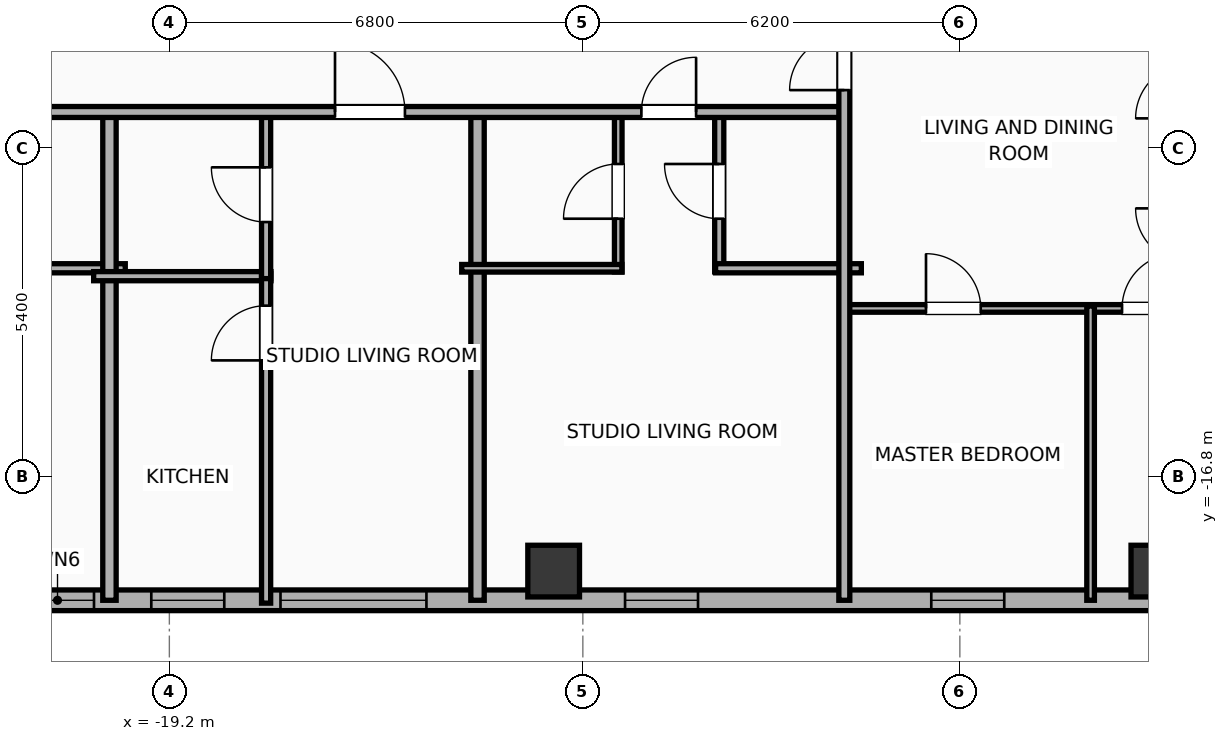
"""IFC4 building model, lengths in metres.
Left out: names, types, materials, properties, quantities, classifications, styles, units other than length and angle.
Written with IfcOpenShell. Run it as: python <this file> out.ifc"""

import sys

from ifc_helpers import new_model, si_unit, direction, frame, frame_2d, origin, origin_2d, place, context, subcontext, project, spatial, rectangle, hollow_rectangle, extrude, element, fill, save


model = new_model("IFC4")
c1 = context("Model", 3, precision=1e-05, world=origin(), true_north=direction((0.0, 1.0)))
c2 = subcontext(c1, "Body", "Model", "MODEL_VIEW")
j1 = project(units=[si_unit("LENGTHUNIT", "METRE"), si_unit("PLANEANGLEUNIT", "RADIAN")], contexts=[c1])
p1 = place(None, origin())
s1 = spatial("IfcSite", under=j1, at=p1, CompositionType="ELEMENT")
p2 = place(p1, origin())
s2 = spatial("IfcBuilding", under=s1, at=p2, CompositionType="ELEMENT")
p3 = place(p2, frame((0.0, 0.0, 219.7)))
s3 = spatial("IfcBuildingStorey", under=s2, at=p3, CompositionType="ELEMENT", Elevation=219.7)
for number, where, z_axis, x_axis in (
    (1, (-12.88, -18.35, 0.0), (0.0, 0.0, 1.0), (1.0, 0.0, 0.0)),
    (2, (-2.96, -18.35, 0.0), (0.0, 0.0, 1.0), (1.0, 0.0, 0.0)),
):
    element("IfcColumn", number, at=place(p3, frame(where, z_axis=z_axis, x_axis=x_axis)), inside=s3, PredefinedType="COLUMN", context=c2, shape_type="SweptSolid", body=[
        extrude(hollow_rectangle(XDim=0.85, YDim=0.85, WallThickness=0.028, at=origin_2d()), origin(), (0.0, 0.0, 1.0), 3.9),
    ])
p4 = place(p3, frame((26.783, -18.83, 0.0), z_axis=(0.0, 0.0, 1.0), x_axis=(-1.0, 0.0, 0.0)))
e3 = element("IfcWall", 3, at=p4, inside=s3, PredefinedType="ELEMENTEDWALL", context=c2, shape_type="SweptSolid", body=[
    extrude(rectangle(XDim=49.566, YDim=0.34, at=frame_2d((24.783, 0.0))), origin(), (0.0, 0.0, 1.0), 3.65),
])
p5 = place(p4, frame((23.583, 0.0, 0.75)))
e4 = element("IfcOpeningElement", 4, at=p5, cuts=e3, PredefinedType="OPENING", context=c2, shape_type="SweptSolid", body=[
    extrude(rectangle(XDim=2.4, YDim=2.1, at=frame_2d((1.2, 1.05))), frame((0.0, 0.18, 0.0), z_axis=(0.0, -1.0, 0.0), x_axis=(1.0, 0.0, 0.0)), (0.0, 0.0, 1.0), 0.36),
])
p6 = place(p4, frame((41.756, 0.0, 0.75)))
e5 = element("IfcOpeningElement", 5, at=p6, cuts=e3, PredefinedType="OPENING", context=c2, shape_type="SweptSolid", body=[
    extrude(rectangle(XDim=2.4, YDim=2.1, at=frame_2d((1.2, 1.05))), frame((0.0, 0.18, 0.0), z_axis=(0.0, -1.0, 0.0), x_axis=(1.0, 0.0, 0.0)), (0.0, 0.0, 1.0), 0.36),
])
p7 = place(p4, frame((47.222, 0.0, 0.75)))
e6 = element("IfcOpeningElement", 6, at=p7, cuts=e3, PredefinedType="OPENING", context=c2, shape_type="SweptSolid", body=[
    extrude(rectangle(XDim=1.2, YDim=2.05, at=frame_2d((0.6, 1.025))), frame((0.0, 0.18, 0.0), z_axis=(0.0, -1.0, 0.0), x_axis=(1.0, 0.0, 0.0)), (0.0, 0.0, 1.0), 0.36),
])
p8 = place(p4, frame((45.08, 0.0, 0.75)))
e7 = element("IfcOpeningElement", 7, at=p8, cuts=e3, PredefinedType="OPENING", context=c2, shape_type="SweptSolid", body=[
    extrude(rectangle(XDim=1.2, YDim=2.05, at=frame_2d((0.6, 1.025))), frame((0.0, 0.18, 0.0), z_axis=(0.0, -1.0, 0.0), x_axis=(1.0, 0.0, 0.0)), (0.0, 0.0, 1.0), 0.36),
])
p9 = place(p4, frame((37.289, 0.0, 0.75)))
e8 = element("IfcOpeningElement", 8, at=p9, cuts=e3, PredefinedType="OPENING", context=c2, shape_type="SweptSolid", body=[
    extrude(rectangle(XDim=1.2, YDim=2.05, at=frame_2d((0.6, 1.025))), frame((0.0, 0.18, 0.0), z_axis=(0.0, -1.0, 0.0), x_axis=(1.0, 0.0, 0.0)), (0.0, 0.0, 1.0), 0.36),
])
p10 = place(p4, frame((16.115, 0.0, 0.75)))
e9 = element("IfcOpeningElement", 9, at=p10, cuts=e3, PredefinedType="OPENING", context=c2, shape_type="SweptSolid", body=[
    extrude(rectangle(XDim=1.2, YDim=2.05, at=frame_2d((0.6, 1.025))), frame((0.0, 0.18, 0.0), z_axis=(0.0, -1.0, 0.0), x_axis=(1.0, 0.0, 0.0)), (0.0, 0.0, 1.0), 0.36),
])
p11 = place(p4, frame((12.422, 0.0, 0.75)))
e10 = element("IfcOpeningElement", 10, at=p11, cuts=e3, PredefinedType="OPENING", context=c2, shape_type="SweptSolid", body=[
    extrude(rectangle(XDim=1.2, YDim=2.05, at=frame_2d((0.6, 1.025))), frame((0.0, 0.18, 0.0), z_axis=(0.0, -1.0, 0.0), x_axis=(1.0, 0.0, 0.0)), (0.0, 0.0, 1.0), 0.36),
])
p12 = place(p4, frame((8.09, 0.0, 0.75)))
e11 = element("IfcOpeningElement", 11, at=p12, cuts=e3, PredefinedType="OPENING", context=c2, shape_type="SweptSolid", body=[
    extrude(rectangle(XDim=1.2, YDim=2.05, at=frame_2d((0.6, 1.025))), frame((0.0, 0.18, 0.0), z_axis=(0.0, -1.0, 0.0), x_axis=(1.0, 0.0, 0.0)), (0.0, 0.0, 1.0), 0.36),
])
p13 = place(p4, frame((4.637, 0.0, 0.75)))
e12 = element("IfcOpeningElement", 12, at=p13, cuts=e3, PredefinedType="OPENING", context=c2, shape_type="SweptSolid", body=[
    extrude(rectangle(XDim=1.2, YDim=2.05, at=frame_2d((0.6, 1.025))), frame((0.0, 0.18, 0.0), z_axis=(0.0, -1.0, 0.0), x_axis=(1.0, 0.0, 0.0)), (0.0, 0.0, 1.0), 0.36),
])
p14 = place(p4, frame((1.811, 0.0, 0.75)))
e13 = element("IfcOpeningElement", 13, at=p14, cuts=e3, PredefinedType="OPENING", context=c2, shape_type="SweptSolid", body=[
    extrude(rectangle(XDim=1.2, YDim=2.05, at=frame_2d((0.6, 1.025))), frame((0.0, 0.18, 0.0), z_axis=(0.0, -1.0, 0.0), x_axis=(1.0, 0.0, 0.0)), (0.0, 0.0, 1.0), 0.36),
])
p15 = place(p4, frame((32.253, 0.0, 0.75)))
e14 = element("IfcOpeningElement", 14, at=p15, cuts=e3, PredefinedType="OPENING", context=c2, shape_type="SweptSolid", body=[
    extrude(rectangle(XDim=1.2, YDim=2.05, at=frame_2d((0.6, 1.025))), frame((0.0, 0.18, 0.0), z_axis=(0.0, -1.0, 0.0), x_axis=(1.0, 0.0, 0.0)), (0.0, 0.0, 1.0), 0.36),
])
p16 = place(p4, frame((27.853, 0.0, 0.75)))
e15 = element("IfcOpeningElement", 15, at=p16, cuts=e3, PredefinedType="OPENING", context=c2, shape_type="SweptSolid", body=[
    extrude(rectangle(XDim=1.2, YDim=2.05, at=frame_2d((0.6, 1.025))), frame((0.0, 0.18, 0.0), z_axis=(0.0, -1.0, 0.0), x_axis=(1.0, 0.0, 0.0)), (0.0, 0.0, 1.0), 0.36),
])
p17 = place(p4, frame((20.473, 0.0, 0.75)))
e16 = element("IfcOpeningElement", 16, at=p17, cuts=e3, PredefinedType="OPENING", context=c2, shape_type="SweptSolid", body=[
    extrude(rectangle(XDim=1.2, YDim=2.05, at=frame_2d((0.6, 1.025))), frame((0.0, 0.18, 0.0), z_axis=(0.0, -1.0, 0.0), x_axis=(1.0, 0.0, 0.0)), (0.0, 0.0, 1.0), 0.36),
])
p18 = place(p3, frame((-22.342, -13.37, 0.0), z_axis=(0.0, 0.0, 1.0), x_axis=(1.0, 0.0, 0.0)))
e17 = element("IfcWall", 17, at=p18, inside=s3, PredefinedType="PLUMBINGWALL", context=c2, shape_type="SweptSolid", body=[
    extrude(rectangle(XDim=2.417, YDim=0.15, at=frame_2d((1.208, 0.0))), origin(), (0.0, 0.0, 1.0), 3.65),
])
p19 = place(p3, frame((-20.185, -18.83, 0.0), z_axis=(0.0, 0.0, 1.0), x_axis=(0.0, 1.0, 0.0)))
e18 = element("IfcWall", 18, at=p19, inside=s3, PredefinedType="PARTITIONING", context=c2, shape_type="SweptSolid", body=[
    extrude(rectangle(XDim=8.11, YDim=0.22, at=frame_2d((4.055, 0.0))), origin(), (0.0, 0.0, 1.0), 3.09),
])
p20 = place(p3, frame((-20.445, -13.5, 0.0), z_axis=(0.0, 0.0, 1.0), x_axis=(1.0, 0.0, 0.0)))
e19 = element("IfcWall", 19, at=p20, inside=s3, PredefinedType="PLUMBINGWALL", context=c2, shape_type="SweptSolid", body=[
    extrude(rectangle(XDim=2.916, YDim=0.15, at=frame_2d((1.458, 0.0))), origin(), (0.0, 0.0, 1.0), 3.65),
])
p21 = place(p3, frame((-17.609, -18.877, 0.0), z_axis=(0.0, 0.0, 1.0), x_axis=(0.0, 1.0, 0.0)))
e20 = element("IfcWall", 20, at=p21, inside=s3, PredefinedType="PLUMBINGWALL", context=c2, shape_type="SweptSolid", body=[
    extrude(rectangle(XDim=5.417, YDim=0.15, at=frame_2d((2.708, 0.0))), origin(), (0.0, 0.0, 1.0), 3.65),
])
p22 = place(p21, frame((3.992, 0.0, 0.0)))
e21 = element("IfcOpeningElement", 21, at=p22, cuts=e20, PredefinedType="OPENING", context=c2, shape_type="SweptSolid", body=[
    extrude(rectangle(XDim=0.9, YDim=2.05, at=frame_2d((0.45, 1.025))), frame((0.0, 0.085, 0.0), z_axis=(0.0, -1.0, 0.0), x_axis=(1.0, 0.0, 0.0)), (0.0, 0.0, 1.0), 0.17),
])
p23 = place(p3, frame((-17.609, -13.54, 0.0), z_axis=(0.0, 0.0, 1.0), x_axis=(0.0, 1.0, 0.0)))
e22 = element("IfcWall", 22, at=p23, inside=s3, PredefinedType="PLUMBINGWALL", context=c2, shape_type="SweptSolid", body=[
    extrude(rectangle(XDim=2.76, YDim=0.15, at=frame_2d((1.38, 0.0))), origin(), (0.0, 0.0, 1.0), 3.65),
])
p24 = place(p23, frame((0.93, 0.0, 0.0)))
e23 = element("IfcOpeningElement", 23, at=p24, cuts=e22, PredefinedType="OPENING", context=c2, shape_type="SweptSolid", body=[
    extrude(rectangle(XDim=0.9, YDim=2.05, at=frame_2d((0.45, 1.025))), frame((0.0, 0.085, 0.0), z_axis=(0.0, -1.0, 0.0), x_axis=(1.0, 0.0, 0.0)), (0.0, 0.0, 1.0), 0.17),
])
p25 = place(p3, frame((-14.132, -18.83, 0.0), z_axis=(0.0, 0.0, 1.0), x_axis=(0.0, 1.0, 0.0)))
e24 = element("IfcWall", 24, at=p25, inside=s3, PredefinedType="PARTITIONING", context=c2, shape_type="SweptSolid", body=[
    extrude(rectangle(XDim=8.11, YDim=0.22, at=frame_2d((4.055, 0.0))), origin(), (0.0, 0.0, 1.0), 3.65),
])
p26 = place(p3, frame((-11.818, -13.43, 0.0), z_axis=(0.0, 0.0, 1.0), x_axis=(0.0, 1.0, 0.0)))
e25 = element("IfcWall", 25, at=p26, inside=s3, PredefinedType="PARTITIONING", context=c2, shape_type="SweptSolid", body=[
    extrude(rectangle(XDim=2.65, YDim=0.125, at=frame_2d((1.325, 0.0))), origin(), (0.0, 0.0, 1.0), 3.65),
])
p27 = place(p26, frame((0.875, 0.0, 0.0)))
e26 = element("IfcOpeningElement", 26, at=p27, cuts=e25, PredefinedType="OPENING", context=c2, shape_type="SweptSolid", body=[
    extrude(rectangle(XDim=0.9, YDim=2.05, at=frame_2d((0.45, 1.025))), frame((0.0, 0.073, 0.0), z_axis=(0.0, -1.0, 0.0), x_axis=(1.0, 0.0, 0.0)), (0.0, 0.0, 1.0), 0.145),
])
p28 = place(p3, frame((-10.157, -13.43, 0.0), z_axis=(0.0, 0.0, 1.0), x_axis=(0.0, 1.0, 0.0)))
e27 = element("IfcWall", 27, at=p28, inside=s3, PredefinedType="PLUMBINGWALL", context=c2, shape_type="SweptSolid", body=[
    extrude(rectangle(XDim=2.65, YDim=0.15, at=frame_2d((1.325, 0.0))), origin(), (0.0, 0.0, 1.0), 3.65),
])
p29 = place(p28, frame((0.875, 0.0, 0.0)))
e28 = element("IfcOpeningElement", 28, at=p29, cuts=e27, PredefinedType="OPENING", context=c2, shape_type="SweptSolid", body=[
    extrude(rectangle(XDim=0.9, YDim=2.05, at=frame_2d((0.45, 1.025))), frame((0.0, 0.085, 0.0), z_axis=(0.0, -1.0, 0.0), x_axis=(1.0, 0.0, 0.0)), (0.0, 0.0, 1.0), 0.17),
])
p30 = place(p3, frame((-14.392, -13.37, 0.0), z_axis=(0.0, 0.0, 1.0), x_axis=(1.0, 0.0, 0.0)))
e29 = element("IfcWall", 29, at=p30, inside=s3, PredefinedType="PARTITIONING", context=c2, shape_type="SweptSolid", body=[
    extrude(rectangle(XDim=2.634, YDim=0.125, at=frame_2d((1.317, 0.0))), origin(), (0.0, 0.0, 1.0), 3.65),
])
p31 = place(p3, frame((-10.217, -13.37, 0.0), z_axis=(0.0, 0.0, 1.0), x_axis=(1.0, 0.0, 0.0)))
e30 = element("IfcWall", 30, at=p31, inside=s3, PredefinedType="PLUMBINGWALL", context=c2, shape_type="SweptSolid", body=[
    extrude(rectangle(XDim=2.397, YDim=0.15, at=frame_2d((1.198, 0.0))), origin(), (0.0, 0.0, 1.0), 3.65),
])
p32 = place(p3, frame((-26.23, -10.8, 0.0), z_axis=(0.0, 0.0, 1.0), x_axis=(1.0, 0.0, 0.0)))
e31 = element("IfcWall", 31, at=p32, inside=s3, PredefinedType="PARTITIONING", context=c2, shape_type="SweptSolid", body=[
    extrude(rectangle(XDim=18.15, YDim=0.18, at=frame_2d((9.075, 0.0))), origin(), (0.0, 0.0, 1.0), 3.65),
])
p33 = place(p32, frame((2.659, 0.0, 0.0)))
e32 = element("IfcOpeningElement", 32, at=p33, cuts=e31, PredefinedType="OPENING", context=c2, shape_type="SweptSolid", body=[
    extrude(rectangle(XDim=0.9, YDim=2.05, at=frame_2d((0.45, 1.025))), frame((0.0, 0.1, 0.0), z_axis=(0.0, -1.0, 0.0), x_axis=(1.0, 0.0, 0.0)), (0.0, 0.0, 1.0), 0.2),
])
p34 = place(p32, frame((9.754, 0.0, 0.0)))
e33 = element("IfcOpeningElement", 33, at=p34, cuts=e31, PredefinedType="OPENING", context=c2, shape_type="SweptSolid", body=[
    extrude(rectangle(XDim=1.15, YDim=2.05, at=frame_2d((0.575, 1.025))), frame((0.0, 0.1, 0.0), z_axis=(0.0, -1.0, 0.0), x_axis=(1.0, 0.0, 0.0)), (0.0, 0.0, 1.0), 0.2),
])
p35 = place(p32, frame((14.792, 0.0, 0.0)))
e34 = element("IfcOpeningElement", 34, at=p35, cuts=e31, PredefinedType="OPENING", context=c2, shape_type="SweptSolid", body=[
    extrude(rectangle(XDim=0.9, YDim=2.05, at=frame_2d((0.45, 1.025))), frame((0.0, 0.1, 0.0), z_axis=(0.0, -1.0, 0.0), x_axis=(1.0, 0.0, 0.0)), (0.0, 0.0, 1.0), 0.2),
])
p36 = place(p3, frame((-8.08, -14.03, 0.0), z_axis=(0.0, 0.0, 1.0), x_axis=(1.0, 0.0, 0.0)))
e35 = element("IfcWall", 35, at=p36, inside=s3, PredefinedType="PARTITIONING", context=c2, shape_type="SweptSolid", body=[
    extrude(rectangle(XDim=8.06, YDim=0.125, at=frame_2d((4.03, 0.0))), origin(), (0.0, 0.0, 1.0), 3.65),
])
p37 = place(p36, frame((1.323, 0.0, 0.0)))
e36 = element("IfcOpeningElement", 36, at=p37, cuts=e35, PredefinedType="OPENING", context=c2, shape_type="SweptSolid", body=[
    extrude(rectangle(XDim=0.9, YDim=2.05, at=frame_2d((0.45, 1.025))), frame((0.0, 0.073, 0.0), z_axis=(0.0, -1.0, 0.0), x_axis=(1.0, 0.0, 0.0)), (0.0, 0.0, 1.0), 0.145),
])
p38 = place(p36, frame((4.547, 0.0, 0.0)))
e37 = element("IfcOpeningElement", 37, at=p38, cuts=e35, PredefinedType="OPENING", context=c2, shape_type="SweptSolid", body=[
    extrude(rectangle(XDim=0.9, YDim=2.05, at=frame_2d((0.45, 1.025))), frame((0.0, 0.073, 0.0), z_axis=(0.0, -1.0, 0.0), x_axis=(1.0, 0.0, 0.0)), (0.0, 0.0, 1.0), 0.145),
])
p39 = place(p3, frame((-4.05, -18.83, 0.0), z_axis=(0.0, 0.0, 1.0), x_axis=(0.0, 1.0, 0.0)))
e38 = element("IfcWall", 38, at=p39, inside=s3, PredefinedType="PARTITIONING", context=c2, shape_type="SweptSolid", body=[
    extrude(rectangle(XDim=4.84, YDim=0.125, at=frame_2d((2.42, 0.0))), origin(), (0.0, 0.0, 1.0), 3.65),
])
p40 = place(p3, frame((-8.1, -18.83, 0.0), z_axis=(0.0, 0.0, 1.0), x_axis=(0.0, 1.0, 0.0)))
e39 = element("IfcWall", 39, at=p40, inside=s3, PredefinedType="PARTITIONING", context=c2, shape_type="SweptSolid", body=[
    extrude(rectangle(XDim=9.64, YDim=0.18, at=frame_2d((4.82, 0.0))), origin(), (0.0, 0.0, 1.0), 3.65),
])
p41 = place(p40, frame((8.39, 0.0, 0.0)))
e40 = element("IfcOpeningElement", 40, at=p41, cuts=e39, PredefinedType="OPENING", context=c2, shape_type="SweptSolid", body=[
    extrude(rectangle(XDim=0.9, YDim=2.05, at=frame_2d((0.45, 1.025))), frame((0.0, 0.1, 0.0), z_axis=(0.0, -1.0, 0.0), x_axis=(1.0, 0.0, 0.0)), (0.0, 0.0, 1.0), 0.2),
])
p42 = place(p6, origin())
e41 = element("IfcWindow", 41, at=p42, inside=s3, PartitioningType="SINGLE_PANEL", PredefinedType="WINDOW", context=c2, shape_type="SweptSolid", body=[
    extrude(rectangle(XDim=2.4, YDim=2.1, at=frame_2d((1.2, 1.05))), frame((0.0, 0.03, 0.0), z_axis=(0.0, -1.0, 0.0), x_axis=(1.0, 0.0, 0.0)), (0.0, 0.0, 1.0), 0.06),
])
fill(e5, e41)
p43 = place(p7, origin())
e42 = element("IfcWindow", 42, at=p43, inside=s3, PartitioningType="SINGLE_PANEL", PredefinedType="WINDOW", context=c2, shape_type="SweptSolid", body=[
    extrude(rectangle(XDim=1.2, YDim=2.05, at=frame_2d((0.6, 1.025))), frame((0.0, 0.03, 0.0), z_axis=(0.0, -1.0, 0.0), x_axis=(1.0, 0.0, 0.0)), (0.0, 0.0, 1.0), 0.06),
])
fill(e6, e42)
p44 = place(p8, origin())
e43 = element("IfcWindow", 43, at=p44, inside=s3, PartitioningType="SINGLE_PANEL", PredefinedType="WINDOW", context=c2, shape_type="SweptSolid", body=[
    extrude(rectangle(XDim=1.2, YDim=2.05, at=frame_2d((0.6, 1.025))), frame((0.0, 0.03, 0.0), z_axis=(0.0, -1.0, 0.0), x_axis=(1.0, 0.0, 0.0)), (0.0, 0.0, 1.0), 0.06),
])
fill(e7, e43)
p45 = place(p9, origin())
e44 = element("IfcWindow", 44, at=p45, inside=s3, PartitioningType="SINGLE_PANEL", PredefinedType="WINDOW", context=c2, shape_type="SweptSolid", body=[
    extrude(rectangle(XDim=1.2, YDim=2.05, at=frame_2d((0.6, 1.025))), frame((0.0, 0.03, 0.0), z_axis=(0.0, -1.0, 0.0), x_axis=(1.0, 0.0, 0.0)), (0.0, 0.0, 1.0), 0.06),
])
fill(e8, e44)
p46 = place(p15, origin())
e45 = element("IfcWindow", 45, at=p46, inside=s3, PartitioningType="SINGLE_PANEL", PredefinedType="WINDOW", context=c2, shape_type="SweptSolid", body=[
    extrude(rectangle(XDim=1.2, YDim=2.05, at=frame_2d((0.6, 1.025))), frame((0.0, 0.03, 0.0), z_axis=(0.0, -1.0, 0.0), x_axis=(1.0, 0.0, 0.0)), (0.0, 0.0, 1.0), 0.06),
])
fill(e14, e45)
p47 = place(p22, origin())
e46 = element("IfcDoor", 46, at=p47, inside=s3, OperationType="SINGLE_SWING_LEFT", PredefinedType="DOOR", context=c2, shape_type="SweptSolid", body=[
    extrude(rectangle(XDim=0.9, YDim=2.05, at=frame_2d((0.45, 1.025))), frame((0.0, 0.025, 0.0), z_axis=(0.0, -1.0, 0.0), x_axis=(1.0, 0.0, 0.0)), (0.0, 0.0, 1.0), 0.05),
])
fill(e21, e46)
p48 = place(p24, origin())
e47 = element("IfcDoor", 47, at=p48, inside=s3, OperationType="SINGLE_SWING_RIGHT", PredefinedType="DOOR", context=c2, shape_type="SweptSolid", body=[
    extrude(rectangle(XDim=0.9, YDim=2.05, at=frame_2d((0.45, 1.025))), frame((0.0, 0.025, 0.0), z_axis=(0.0, -1.0, 0.0), x_axis=(1.0, 0.0, 0.0)), (0.0, 0.0, 1.0), 0.05),
])
fill(e23, e47)
p49 = place(p27, origin())
e48 = element("IfcDoor", 48, at=p49, inside=s3, OperationType="SINGLE_SWING_LEFT", PredefinedType="DOOR", context=c2, shape_type="SweptSolid", body=[
    extrude(rectangle(XDim=0.9, YDim=2.05, at=frame_2d((0.45, 1.025))), frame((0.0, 0.025, 0.0), z_axis=(0.0, -1.0, 0.0), x_axis=(1.0, 0.0, 0.0)), (0.0, 0.0, 1.0), 0.05),
])
fill(e26, e48)
p50 = place(p29, origin())
e49 = element("IfcDoor", 49, at=p50, inside=s3, OperationType="SINGLE_SWING_RIGHT", PredefinedType="DOOR", context=c2, shape_type="SweptSolid", body=[
    extrude(rectangle(XDim=0.9, YDim=2.05, at=frame_2d((0.45, 1.025))), frame((0.0, 0.025, 0.0), z_axis=(0.0, -1.0, 0.0), x_axis=(1.0, 0.0, 0.0)), (0.0, 0.0, 1.0), 0.05),
])
fill(e28, e49)
p51 = place(p34, origin())
e50 = element("IfcDoor", 50, at=p51, inside=s3, OperationType="SINGLE_SWING_LEFT", PredefinedType="DOOR", context=c2, shape_type="SweptSolid", body=[
    extrude(rectangle(XDim=1.15, YDim=2.05, at=frame_2d((0.575, 1.025))), frame((0.0, 0.025, 0.0), z_axis=(0.0, -1.0, 0.0), x_axis=(1.0, 0.0, 0.0)), (0.0, 0.0, 1.0), 0.05),
])
fill(e33, e50)
p52 = place(p35, origin())
e51 = element("IfcDoor", 51, at=p52, inside=s3, OperationType="SINGLE_SWING_RIGHT", PredefinedType="DOOR", context=c2, shape_type="SweptSolid", body=[
    extrude(rectangle(XDim=0.9, YDim=2.05, at=frame_2d((0.45, 1.025))), frame((0.0, 0.025, 0.0), z_axis=(0.0, -1.0, 0.0), x_axis=(1.0, 0.0, 0.0)), (0.0, 0.0, 1.0), 0.05),
])
fill(e34, e51)
p53 = place(p37, origin())
e52 = element("IfcDoor", 52, at=p53, inside=s3, OperationType="SINGLE_SWING_LEFT", PredefinedType="DOOR", context=c2, shape_type="SweptSolid", body=[
    extrude(rectangle(XDim=0.9, YDim=2.05, at=frame_2d((0.45, 1.025))), frame((0.0, 0.025, 0.0), z_axis=(0.0, -1.0, 0.0), x_axis=(1.0, 0.0, 0.0)), (0.0, 0.0, 1.0), 0.05),
])
fill(e36, e52)
p54 = place(p38, origin())
e53 = element("IfcDoor", 53, at=p54, inside=s3, OperationType="SINGLE_SWING_RIGHT", PredefinedType="DOOR", context=c2, shape_type="SweptSolid", body=[
    extrude(rectangle(XDim=0.9, YDim=2.05, at=frame_2d((0.45, 1.025))), frame((0.0, 0.025, 0.0), z_axis=(0.0, -1.0, 0.0), x_axis=(1.0, 0.0, 0.0)), (0.0, 0.0, 1.0), 0.05),
])
fill(e37, e53)
p55 = place(p41, origin())
e54 = element("IfcDoor", 54, at=p55, inside=s3, OperationType="SINGLE_SWING_LEFT", PredefinedType="DOOR", context=c2, shape_type="SweptSolid", body=[
    extrude(rectangle(XDim=0.9, YDim=2.05, at=frame_2d((0.45, 1.025))), frame((0.0, 0.025, 0.0), z_axis=(0.0, -1.0, 0.0), x_axis=(1.0, 0.0, 0.0)), (0.0, 0.0, 1.0), 0.05),
])
fill(e40, e54)
save(model, sys.argv[1])
